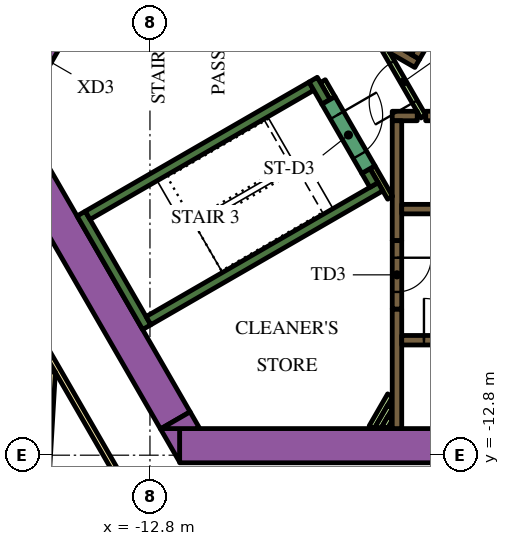
"""IFC4 building model, lengths in metres.
Left out: names, types, materials, properties, quantities, classifications, styles, units other than length and angle.
Written with IfcOpenShell. Run it as: python <this file> out.ifc"""

import sys

from ifc_helpers import new_model, si_unit, direction, frame, frame_2d, origin, place, context, subcontext, project, spatial, polyline, rectangle, outline, extrude, element, fill, save


model = new_model("IFC4")
c1 = context("Model", 3, precision=1e-05, world=origin(), true_north=direction((0.0, 1.0)))
c2 = subcontext(c1, "Body", "Model", "MODEL_VIEW")
j1 = project(units=[si_unit("LENGTHUNIT", "METRE"), si_unit("PLANEANGLEUNIT", "RADIAN")], contexts=[c1])
p1 = place(None, origin())
s1 = spatial("IfcSite", under=j1, at=p1, CompositionType="ELEMENT")
p2 = place(p1, origin())
s2 = spatial("IfcBuilding", under=s1, at=p2, CompositionType="ELEMENT")
p3 = place(p2, frame((0.0, 0.0, 107.1)))
s3 = spatial("IfcBuildingStorey", under=s2, at=p3, CompositionType="ELEMENT", Elevation=107.1)
p4 = place(p3, frame((-12.019, -12.55, 0.0), z_axis=(0.0, 0.0, 1.0), x_axis=(1.0, 0.0, 0.0)))
e1 = element("IfcWall", 1, at=p4, inside=s3, PredefinedType="SOLIDWALL", context=c2, shape_type="SweptSolid", body=[
    extrude(rectangle(XDim=21.63, YDim=0.9, at=frame_2d((10.815, 0.0))), origin(), (0.0, 0.0, 1.0), 3.9),
])
p5 = place(p3, origin())
e2 = element("IfcWall", 2, at=p5, inside=s3, PredefinedType="SOLIDWALL", context=c2, shape_type="SweptSolid", body=[
    extrude(outline(polyline([(-12.529, -12.1), (-12.021, -12.1), (-12.021, -12.98), (-12.529, -12.1)])), origin(), (0.0, 0.0, 1.0), 3.9),
])
p6 = place(p3, frame((-12.134, -11.883, 0.0), z_axis=(0.0, 0.0, 1.0), x_axis=(-0.500005339912, 0.866022320763, 0.0)))
e3 = element("IfcWall", 3, at=p6, inside=s3, PredefinedType="SOLIDWALL", context=c2, shape_type="SweptSolid", body=[
    extrude(rectangle(XDim=9.488, YDim=0.9, at=frame_2d((4.744, 0.0))), origin(), (0.0, 0.0, 1.0), 3.9),
])
e4 = element("IfcWall", 4, at=p5, inside=s3, PredefinedType="SOLIDWALL", context=c2, shape_type="SweptSolid", body=[
    extrude(outline(polyline([(-11.489, -12.1), (-12.505, -12.1), (-11.743, -11.66), (-11.489, -12.1)])), origin(), (0.0, 0.0, 1.0), 3.9),
])
p7 = place(p3, frame((-12.885, -9.431, 0.0), z_axis=(0.0, 0.0, 1.0), x_axis=(-0.500020560727, 0.866013532718, 0.0)))
e5 = element("IfcWall", 5, at=p7, inside=s3, PredefinedType="SOLIDWALL", context=c2, shape_type="SweptSolid", body=[
    extrude(rectangle(XDim=3.45, YDim=0.25, at=frame_2d((1.725, 0.0))), origin(), (0.0, 0.0, 1.0), 3.9),
])
p8 = place(p3, frame((-14.44, -6.49, 0.0), z_axis=(0.0, 0.0, 1.0), x_axis=(0.866022966069, 0.500004222222, 0.0)))
e6 = element("IfcWall", 6, at=p8, inside=s3, PredefinedType="SOLIDWALL", context=c2, shape_type="SweptSolid", body=[
    extrude(rectangle(XDim=6.8, YDim=0.25, at=frame_2d((3.4, 0.0))), origin(), (0.0, 0.0, 1.0), 3.9),
])
p9 = place(p3, frame((-8.168, -3.503, 0.0), z_axis=(0.0, 0.0, 1.0), x_axis=(-0.499952099219, 0.866053057547, 0.0)))
e7 = element("IfcWall", 7, at=p9, inside=s3, PredefinedType="SOLIDWALL", context=c2, shape_type="SweptSolid", body=[
    extrude(rectangle(XDim=0.675, YDim=0.25, at=frame_2d((0.337, 0.0))), origin(), (0.0, 0.0, 1.0), 3.9),
])
p10 = place(p3, frame((-12.84, -9.261, 0.0), z_axis=(0.0, 0.0, 1.0), x_axis=(0.866016039709, 0.500016218704, 0.0)))
e8 = element("IfcWall", 8, at=p10, inside=s3, PredefinedType="SOLIDWALL", context=c2, shape_type="SweptSolid", body=[
    extrude(rectangle(XDim=7.05, YDim=0.25, at=frame_2d((3.525, 0.0))), origin(), (0.0, 0.0, 1.0), 3.9),
])
p11 = place(p3, frame((-6.905, -5.69, 0.0), z_axis=(0.0, 0.0, 1.0), x_axis=(-0.500402024738, 0.865793170242, 0.0)))
e9 = element("IfcWall", 9, at=p11, inside=s3, PredefinedType="SOLIDWALL", context=c2, shape_type="SweptSolid", body=[
    extrude(rectangle(XDim=0.425, YDim=0.25, at=frame_2d((0.212, 0.0))), origin(), (0.0, 0.0, 1.0), 3.9),
])
p12 = place(p3, frame((-6.3, -12.1, 0.0), z_axis=(0.0, 0.0, 1.0), x_axis=(0.0, 1.0, 0.0)))
e10 = element("IfcWall", 10, at=p12, inside=s3, PredefinedType="SOLIDWALL", context=c2, shape_type="SweptSolid", body=[
    extrude(rectangle(XDim=3.146, YDim=0.25, at=frame_2d((1.573, 0.0))), origin(), (0.0, 0.0, 1.0), 3.9),
])
p13 = place(p3, frame((-5.545, -3.875, 0.0), z_axis=(0.0, 0.0, 1.0), x_axis=(1.0, 0.0, 0.0)))
e11 = element("IfcWall", 11, at=p13, inside=s3, PredefinedType="SOLIDWALL", context=c2, shape_type="SweptSolid", body=[
    extrude(rectangle(XDim=11.97, YDim=0.25, at=frame_2d((5.985, 0.0))), origin(), (0.0, 0.0, 1.0), 3.9),
])
p14 = place(p3, frame((-6.425, -3.875, 0.0), z_axis=(0.0, 0.0, 1.0), x_axis=(1.0, 0.0, 0.0)))
e12 = element("IfcWall", 12, at=p14, inside=s3, PredefinedType="SOLIDWALL", context=c2, shape_type="SweptSolid", body=[
    extrude(rectangle(XDim=0.658, YDim=0.25, at=frame_2d((0.329, 0.0))), origin(), (0.0, 0.0, 1.0), 3.9),
])
p15 = place(p3, frame((-6.3, -4.0, 0.0), z_axis=(0.0, 0.0, 1.0), x_axis=(0.0, -1.0, 0.0)))
e13 = element("IfcWall", 13, at=p15, inside=s3, PredefinedType="SOLIDWALL", context=c2, shape_type="SweptSolid", body=[
    extrude(rectangle(XDim=3.154, YDim=0.25, at=frame_2d((1.577, 0.0))), origin(), (0.0, 0.0, 1.0), 3.9),
])
e14 = element("IfcWall", 14, at=p5, inside=s3, PredefinedType="SOLIDWALL", context=c2, shape_type="SweptSolid", body=[
    extrude(outline(polyline([(-5.922, -2.257), (-5.922, -2.257), (-5.705, -2.382), (-5.83, -2.598), (-6.483, -2.221), (-6.591, -2.033), (-6.591, -2.033), (-6.7, -2.096), (-7.952, -1.373), (-7.827, -1.156), (-5.922, -2.257)])), origin(), (0.0, 0.0, 1.0), 3.9),
])
p16 = place(p3, frame((-6.968, -12.068, 0.0), z_axis=(0.0, 0.0, 1.0), x_axis=(0.49998975084, 0.866031321059, 0.0)))
e15 = element("IfcWall", 15, at=p16, inside=s3, PredefinedType="PARTITIONING", context=c2, shape_type="SweptSolid", body=[
    extrude(rectangle(XDim=0.975, YDim=0.15, at=frame_2d((0.488, 0.0))), origin(), (0.0, 0.0, 1.0), 2.75),
])
p17 = place(p3, frame((-6.794, -12.068, 0.0), z_axis=(0.0, 0.0, 1.0), x_axis=(0.49985693963, 0.866107983974, 0.0)))
e16 = element("IfcWall", 16, at=p17, inside=s3, PredefinedType="PARTITIONING", context=c2, shape_type="SweptSolid", body=[
    extrude(rectangle(XDim=0.629, YDim=0.15, at=frame_2d((0.314, 0.0))), origin(), (0.0, 0.0, 1.0), 2.75),
])
p18 = place(p3, frame((-6.621, -12.068, 0.0), z_axis=(0.0, 0.0, 1.0), x_axis=(0.500046963369, 0.865998287773, 0.0)))
e17 = element("IfcWall", 17, at=p18, inside=s3, PredefinedType="PARTITIONING", context=c2, shape_type="SweptSolid", body=[
    extrude(rectangle(XDim=0.282, YDim=0.15, at=frame_2d((0.141, 0.0))), origin(), (0.0, 0.0, 1.0), 2.75),
])
p19 = place(p3, frame((-6.48, -6.027, 0.0), z_axis=(0.0, 0.0, 1.0), x_axis=(-0.499927229454, 0.866067413802, 0.0)))
e18 = element("IfcWall", 18, at=p19, inside=s3, PredefinedType="PARTITIONING", context=c2, shape_type="SweptSolid", body=[
    extrude(rectangle(XDim=0.929, YDim=0.15, at=frame_2d((0.464, 0.0))), origin(), (0.0, 0.0, 1.0), 3.9),
])
p20 = place(p3, frame((-8.252, -2.958, 0.0), z_axis=(0.0, 0.0, 1.0), x_axis=(0.500174715838, -0.865924508047, 0.0)))
e19 = element("IfcWall", 19, at=p20, inside=s3, PredefinedType="PARTITIONING", context=c2, shape_type="SweptSolid", body=[
    extrude(rectangle(XDim=0.514, YDim=0.15, at=frame_2d((0.257, 0.0))), origin(), (0.0, 0.0, 1.0), 2.75),
])
p21 = place(p3, frame((-6.175, -9.775, 0.0), z_axis=(0.0, 0.0, 1.0), x_axis=(1.0, 0.0, 0.0)))
e20 = element("IfcWall", 20, at=p21, inside=s3, PredefinedType="SOLIDWALL", context=c2, shape_type="SweptSolid", body=[
    extrude(rectangle(XDim=12.35, YDim=0.25, at=frame_2d((6.175, 0.0))), origin(), (0.0, 0.0, 1.0), 3.9),
])
p22 = place(p21, frame((0.585, 0.0, 0.0)))
e21 = element("IfcOpeningElement", 21, at=p22, cuts=e20, PredefinedType="OPENING", context=c2, shape_type="SweptSolid", body=[
    extrude(rectangle(XDim=1.1, YDim=2.1, at=frame_2d((0.55, 1.05))), frame((0.0, 0.135, 0.0), z_axis=(0.0, -1.0, 0.0), x_axis=(1.0, 0.0, 0.0)), (0.0, 0.0, 1.0), 0.27),
])
p23 = place(p21, frame((3.105, 0.0, 0.0)))
e22 = element("IfcOpeningElement", 22, at=p23, cuts=e20, PredefinedType="OPENING", context=c2, shape_type="SweptSolid", body=[
    extrude(rectangle(XDim=1.1, YDim=2.1, at=frame_2d((0.55, 1.05))), frame((0.0, 0.135, 0.0), z_axis=(0.0, -1.0, 0.0), x_axis=(1.0, 0.0, 0.0)), (0.0, 0.0, 1.0), 0.27),
])
p24 = place(p21, frame((5.625, 0.0, 0.0)))
e23 = element("IfcOpeningElement", 23, at=p24, cuts=e20, PredefinedType="OPENING", context=c2, shape_type="SweptSolid", body=[
    extrude(rectangle(XDim=1.1, YDim=2.1, at=frame_2d((0.55, 1.05))), frame((0.0, 0.135, 0.0), z_axis=(0.0, -1.0, 0.0), x_axis=(1.0, 0.0, 0.0)), (0.0, 0.0, 1.0), 0.27),
])
p25 = place(p21, frame((8.145, 0.0, 0.0)))
e24 = element("IfcOpeningElement", 24, at=p25, cuts=e20, PredefinedType="OPENING", context=c2, shape_type="SweptSolid", body=[
    extrude(rectangle(XDim=1.1, YDim=2.1, at=frame_2d((0.55, 1.05))), frame((0.0, 0.135, 0.0), z_axis=(0.0, -1.0, 0.0), x_axis=(1.0, 0.0, 0.0)), (0.0, 0.0, 1.0), 0.27),
])
p26 = place(p21, frame((10.665, 0.0, 0.0)))
e25 = element("IfcOpeningElement", 25, at=p26, cuts=e20, PredefinedType="OPENING", context=c2, shape_type="SweptSolid", body=[
    extrude(rectangle(XDim=1.1, YDim=2.1, at=frame_2d((0.55, 1.05))), frame((0.0, 0.135, 0.0), z_axis=(0.0, -1.0, 0.0), x_axis=(1.0, 0.0, 0.0)), (0.0, 0.0, 1.0), 0.27),
])
p27 = place(p3, frame((-6.175, -6.325, 0.0), z_axis=(0.0, 0.0, 1.0), x_axis=(1.0, 0.0, 0.0)))
e26 = element("IfcWall", 26, at=p27, inside=s3, PredefinedType="SOLIDWALL", context=c2, shape_type="SweptSolid", body=[
    extrude(rectangle(XDim=12.35, YDim=0.25, at=frame_2d((6.175, 0.0))), origin(), (0.0, 0.0, 1.0), 3.9),
])
p28 = place(p27, frame((3.205, 0.0, 0.0)))
e27 = element("IfcOpeningElement", 27, at=p28, cuts=e26, PredefinedType="OPENING", context=c2, shape_type="SweptSolid", body=[
    extrude(rectangle(XDim=0.9, YDim=2.1, at=frame_2d((0.45, 1.05))), frame((0.0, 0.135, 0.0), z_axis=(0.0, -1.0, 0.0), x_axis=(1.0, 0.0, 0.0)), (0.0, 0.0, 1.0), 0.27),
])
p29 = place(p27, frame((8.145, 0.0, 0.0)))
e28 = element("IfcOpeningElement", 28, at=p29, cuts=e26, PredefinedType="OPENING", context=c2, shape_type="SweptSolid", body=[
    extrude(rectangle(XDim=1.1, YDim=2.1, at=frame_2d((0.55, 1.05))), frame((0.0, 0.135, 0.0), z_axis=(0.0, -1.0, 0.0), x_axis=(1.0, 0.0, 0.0)), (0.0, 0.0, 1.0), 0.27),
])
p30 = place(p27, frame((10.665, 0.0, 0.0)))
e29 = element("IfcOpeningElement", 29, at=p30, cuts=e26, PredefinedType="OPENING", context=c2, shape_type="SweptSolid", body=[
    extrude(rectangle(XDim=1.1, YDim=2.1, at=frame_2d((0.55, 1.05))), frame((0.0, 0.135, 0.0), z_axis=(0.0, -1.0, 0.0), x_axis=(1.0, 0.0, 0.0)), (0.0, 0.0, 1.0), 0.27),
])
p31 = place(p3, frame((-0.898, 6.194, 0.0), z_axis=(0.0, 0.0, 1.0), x_axis=(-0.499996202215, -0.866027596426, 0.0)))
e30 = element("IfcWall", 30, at=p31, inside=s3, PredefinedType="SOLIDWALL", context=c2, shape_type="SweptSolid", body=[
    extrude(rectangle(XDim=9.83, YDim=0.25, at=frame_2d((4.915, 0.0))), origin(), (0.0, 0.0, 1.0), 3.9),
])
p32 = place(p31, frame((0.585, 0.0, 0.0)))
e31 = element("IfcOpeningElement", 31, at=p32, cuts=e30, PredefinedType="OPENING", context=c2, shape_type="SweptSolid", body=[
    extrude(rectangle(XDim=1.1, YDim=2.1, at=frame_2d((0.55, 1.05))), frame((0.0, 0.135, 0.0), z_axis=(0.0, -1.0, 0.0), x_axis=(1.0, 0.0, 0.0)), (0.0, 0.0, 1.0), 0.27),
])
p33 = place(p31, frame((3.105, 0.0, 0.0)))
e32 = element("IfcOpeningElement", 32, at=p33, cuts=e30, PredefinedType="OPENING", context=c2, shape_type="SweptSolid", body=[
    extrude(rectangle(XDim=1.1, YDim=2.1, at=frame_2d((0.55, 1.05))), frame((0.0, 0.135, 0.0), z_axis=(0.0, -1.0, 0.0), x_axis=(1.0, 0.0, 0.0)), (0.0, 0.0, 1.0), 0.27),
])
p34 = place(p31, frame((5.625, 0.0, 0.0)))
e33 = element("IfcOpeningElement", 33, at=p34, cuts=e30, PredefinedType="OPENING", context=c2, shape_type="SweptSolid", body=[
    extrude(rectangle(XDim=1.1, YDim=2.1, at=frame_2d((0.55, 1.05))), frame((0.0, 0.135, 0.0), z_axis=(0.0, -1.0, 0.0), x_axis=(1.0, 0.0, 0.0)), (0.0, 0.0, 1.0), 0.27),
])
p35 = place(p31, frame((8.145, 0.0, 0.0)))
e34 = element("IfcOpeningElement", 34, at=p35, cuts=e30, PredefinedType="OPENING", context=c2, shape_type="SweptSolid", body=[
    extrude(rectangle(XDim=1.1, YDim=2.1, at=frame_2d((0.55, 1.05))), frame((0.0, 0.135, 0.0), z_axis=(0.0, -1.0, 0.0), x_axis=(1.0, 0.0, 0.0)), (0.0, 0.0, 1.0), 0.27),
])
p36 = place(p3, frame((-8.103, -3.466, 0.0), z_axis=(0.0, 0.0, 1.0), x_axis=(0.500078061341, -0.865980330357, 0.0)))
e35 = element("IfcWall", 35, at=p36, inside=s3, PredefinedType="SOLIDWALL", context=c2, shape_type="SweptSolid", body=[
    extrude(rectangle(XDim=2.1, YDim=0.4, at=frame_2d((1.05, 0.0))), origin(), (0.0, 0.0, 1.0), 3.9),
])
p37 = place(p36, frame((0.45, 0.0, 0.0)))
e36 = element("IfcOpeningElement", 36, at=p37, cuts=e35, PredefinedType="OPENING", context=c2, shape_type="SweptSolid", body=[
    extrude(rectangle(XDim=1.2, YDim=2.1, at=frame_2d((0.6, 1.05))), frame((0.0, 0.21, 0.0), z_axis=(0.0, -1.0, 0.0), x_axis=(1.0, 0.0, 0.0)), (0.0, 0.0, 1.0), 0.42),
])
p38 = place(p3, frame((-6.3, -7.154, 0.0), z_axis=(0.0, 0.0, 1.0), x_axis=(0.0, -1.0, 0.0)))
e37 = element("IfcWall", 37, at=p38, inside=s3, PredefinedType="SOLIDWALL", context=c2, shape_type="SweptSolid", body=[
    extrude(rectangle(XDim=1.8, YDim=0.25, at=frame_2d((0.9, 0.0))), origin(), (0.0, 0.0, 1.0), 3.9),
])
p39 = place(p38, frame((0.45, 0.0, 0.0)))
e38 = element("IfcOpeningElement", 38, at=p39, cuts=e37, PredefinedType="OPENING", context=c2, shape_type="SweptSolid", body=[
    extrude(rectangle(XDim=0.9, YDim=2.1, at=frame_2d((0.45, 1.05))), frame((0.0, 0.135, 0.0), z_axis=(0.0, -1.0, 0.0), x_axis=(1.0, 0.0, 0.0)), (0.0, 0.0, 1.0), 0.27),
])
p40 = place(p3, frame((-5.606, -3.89, 0.0), z_axis=(0.0, 0.0, 1.0), x_axis=(-0.500027713859, 0.866009402589, 0.0)))
e39 = element("IfcWall", 39, at=p40, inside=s3, PredefinedType="PARTITIONING", context=c2, shape_type="SweptSolid", body=[
    extrude(rectangle(XDim=2.1, YDim=0.15, at=frame_2d((1.05, 0.0))), origin(), (0.0, 0.0, 1.0), 2.75),
])
p41 = place(p40, frame((0.45, 0.0, 0.0)))
e40 = element("IfcOpeningElement", 40, at=p41, cuts=e39, PredefinedType="OPENING", context=c2, shape_type="SweptSolid", body=[
    extrude(rectangle(XDim=1.2, YDim=2.1, at=frame_2d((0.6, 1.05))), frame((0.0, 0.085, 0.0), z_axis=(0.0, -1.0, 0.0), x_axis=(1.0, 0.0, 0.0)), (0.0, 0.0, 1.0), 0.17),
])
p42 = place(p3, frame((-16.209, -2.976, 0.0), z_axis=(0.0, 0.0, 1.0), x_axis=(0.499954529098, 0.86605165483, 0.0)))
e41 = element("IfcWall", 41, at=p42, inside=s3, PredefinedType="SOLIDWALL", context=c2, shape_type="SweptSolid", body=[
    extrude(rectangle(XDim=1.7, YDim=0.9, at=frame_2d((0.85, 0.0))), origin(), (0.0, 0.0, 1.0), 3.9),
])
p43 = place(p42, frame((0.25, 0.0, 0.0)))
e42 = element("IfcOpeningElement", 42, at=p43, cuts=e41, PredefinedType="OPENING", context=c2, shape_type="SweptSolid", body=[
    extrude(rectangle(XDim=1.2, YDim=2.1, at=frame_2d((0.6, 1.05))), frame((0.0, 0.46, 0.0), z_axis=(0.0, -1.0, 0.0), x_axis=(1.0, 0.0, 0.0)), (0.0, 0.0, 1.0), 0.92),
])
p44 = place(p3, frame((-19.081, -3.9, 0.0), z_axis=(0.0, 0.0, 1.0), x_axis=(0.499998313975, 0.866026377209, 0.0)))
e43 = element("IfcWall", 43, at=p44, inside=s3, PredefinedType="PARTITIONING", context=c2, shape_type="SweptSolid", body=[
    extrude(rectangle(XDim=25.766, YDim=0.15, at=frame_2d((12.883, 0.0))), origin(), (0.0, 0.0, 1.0), 2.75),
])
p45 = place(p44, frame((19.306, 0.0, 0.0)))
e44 = element("IfcOpeningElement", 44, at=p45, cuts=e43, PredefinedType="OPENING", context=c2, shape_type="SweptSolid", body=[
    extrude(rectangle(XDim=1.0, YDim=2.1, at=frame_2d((0.5, 1.05))), frame((0.0, 0.085, 0.0), z_axis=(0.0, -1.0, 0.0), x_axis=(1.0, 0.0, 0.0)), (0.0, 0.0, 1.0), 0.17),
])
p46 = place(p44, frame((18.0, 0.0, 0.0)))
e45 = element("IfcOpeningElement", 45, at=p46, cuts=e43, PredefinedType="OPENING", context=c2, shape_type="SweptSolid", body=[
    extrude(rectangle(XDim=1.0, YDim=2.1, at=frame_2d((0.5, 1.05))), frame((0.0, 0.085, 0.0), z_axis=(0.0, -1.0, 0.0), x_axis=(1.0, 0.0, 0.0)), (0.0, 0.0, 1.0), 0.17),
])
p47 = place(p44, frame((6.838, 0.0, 0.0)))
e46 = element("IfcOpeningElement", 46, at=p47, cuts=e43, PredefinedType="OPENING", context=c2, shape_type="SweptSolid", body=[
    extrude(rectangle(XDim=1.0, YDim=2.1, at=frame_2d((0.5, 1.05))), frame((0.0, 0.085, 0.0), z_axis=(0.0, -1.0, 0.0), x_axis=(1.0, 0.0, 0.0)), (0.0, 0.0, 1.0), 0.17),
])
p48 = place(p44, frame((4.674, 0.0, 0.0)))
e47 = element("IfcOpeningElement", 47, at=p48, cuts=e43, PredefinedType="OPENING", context=c2, shape_type="SweptSolid", body=[
    extrude(rectangle(XDim=0.9, YDim=2.1, at=frame_2d((0.45, 1.05))), frame((0.0, 0.085, 0.0), z_axis=(0.0, -1.0, 0.0), x_axis=(1.0, 0.0, 0.0)), (0.0, 0.0, 1.0), 0.17),
])
p49 = place(p44, frame((0.18, 0.0, 0.0)))
e48 = element("IfcOpeningElement", 48, at=p49, cuts=e43, PredefinedType="OPENING", context=c2, shape_type="SweptSolid", body=[
    extrude(rectangle(XDim=1.0, YDim=2.1, at=frame_2d((0.5, 1.05))), frame((0.0, 0.085, 0.0), z_axis=(0.0, -1.0, 0.0), x_axis=(1.0, 0.0, 0.0)), (0.0, 0.0, 1.0), 0.17),
])
p50 = place(p3, frame((-12.918, -14.575, 0.0), z_axis=(0.0, 0.0, 1.0), x_axis=(-0.500009150678, 0.866020120573, 0.0)))
e49 = element("IfcWall", 49, at=p50, inside=s3, PredefinedType="PARTITIONING", context=c2, shape_type="SweptSolid", body=[
    extrude(rectangle(XDim=5.258, YDim=0.15, at=frame_2d((2.629, 0.0))), origin(), (0.0, 0.0, 1.0), 2.75),
])
p51 = place(p3, frame((-15.999, -21.467, 0.0), z_axis=(0.0, 0.0, 1.0), x_axis=(0.058411453297, 0.998292593443, 0.0)))
e50 = element("IfcWall", 50, at=p51, inside=s3, PredefinedType="PARTITIONING", context=c2, shape_type="SweptSolid", body=[
    extrude(rectangle(XDim=10.875, YDim=0.15, at=frame_2d((5.438, 0.0))), origin(), (0.0, 0.0, 1.0), 2.75),
])
p52 = place(p22, origin())
e51 = element("IfcDoor", 51, at=p52, inside=s3, OperationType="DOUBLE_DOOR_SLIDING", PredefinedType="DOOR", context=c2, shape_type="SweptSolid", body=[
    extrude(rectangle(XDim=1.1, YDim=2.1, at=frame_2d((0.55, 1.05))), frame((0.0, 0.025, 0.0), z_axis=(0.0, -1.0, 0.0), x_axis=(1.0, 0.0, 0.0)), (0.0, 0.0, 1.0), 0.05),
])
fill(e21, e51)
p53 = place(p37, origin())
e52 = element("IfcDoor", 52, at=p53, inside=s3, OperationType="SINGLE_SWING_LEFT", PredefinedType="DOOR", context=c2, shape_type="SweptSolid", body=[
    extrude(rectangle(XDim=1.2, YDim=2.1, at=frame_2d((0.6, 1.05))), frame((0.0, 0.025, 0.0), z_axis=(0.0, -1.0, 0.0), x_axis=(1.0, 0.0, 0.0)), (0.0, 0.0, 1.0), 0.05),
])
fill(e36, e52)
p54 = place(p39, origin())
e53 = element("IfcDoor", 53, at=p54, inside=s3, OperationType="SINGLE_SWING_LEFT", PredefinedType="DOOR", context=c2, shape_type="SweptSolid", body=[
    extrude(rectangle(XDim=0.9, YDim=2.1, at=frame_2d((0.45, 1.05))), frame((0.0, 0.025, 0.0), z_axis=(0.0, -1.0, 0.0), x_axis=(1.0, 0.0, 0.0)), (0.0, 0.0, 1.0), 0.05),
])
fill(e38, e53)
p55 = place(p41, origin())
e54 = element("IfcDoor", 54, at=p55, inside=s3, OperationType="SINGLE_SWING_LEFT", PredefinedType="DOOR", context=c2, shape_type="SweptSolid", body=[
    extrude(rectangle(XDim=1.2, YDim=2.1, at=frame_2d((0.6, 1.05))), frame((0.0, 0.025, 0.0), z_axis=(0.0, -1.0, 0.0), x_axis=(1.0, 0.0, 0.0)), (0.0, 0.0, 1.0), 0.05),
])
fill(e40, e54)
save(model, sys.argv[1])
